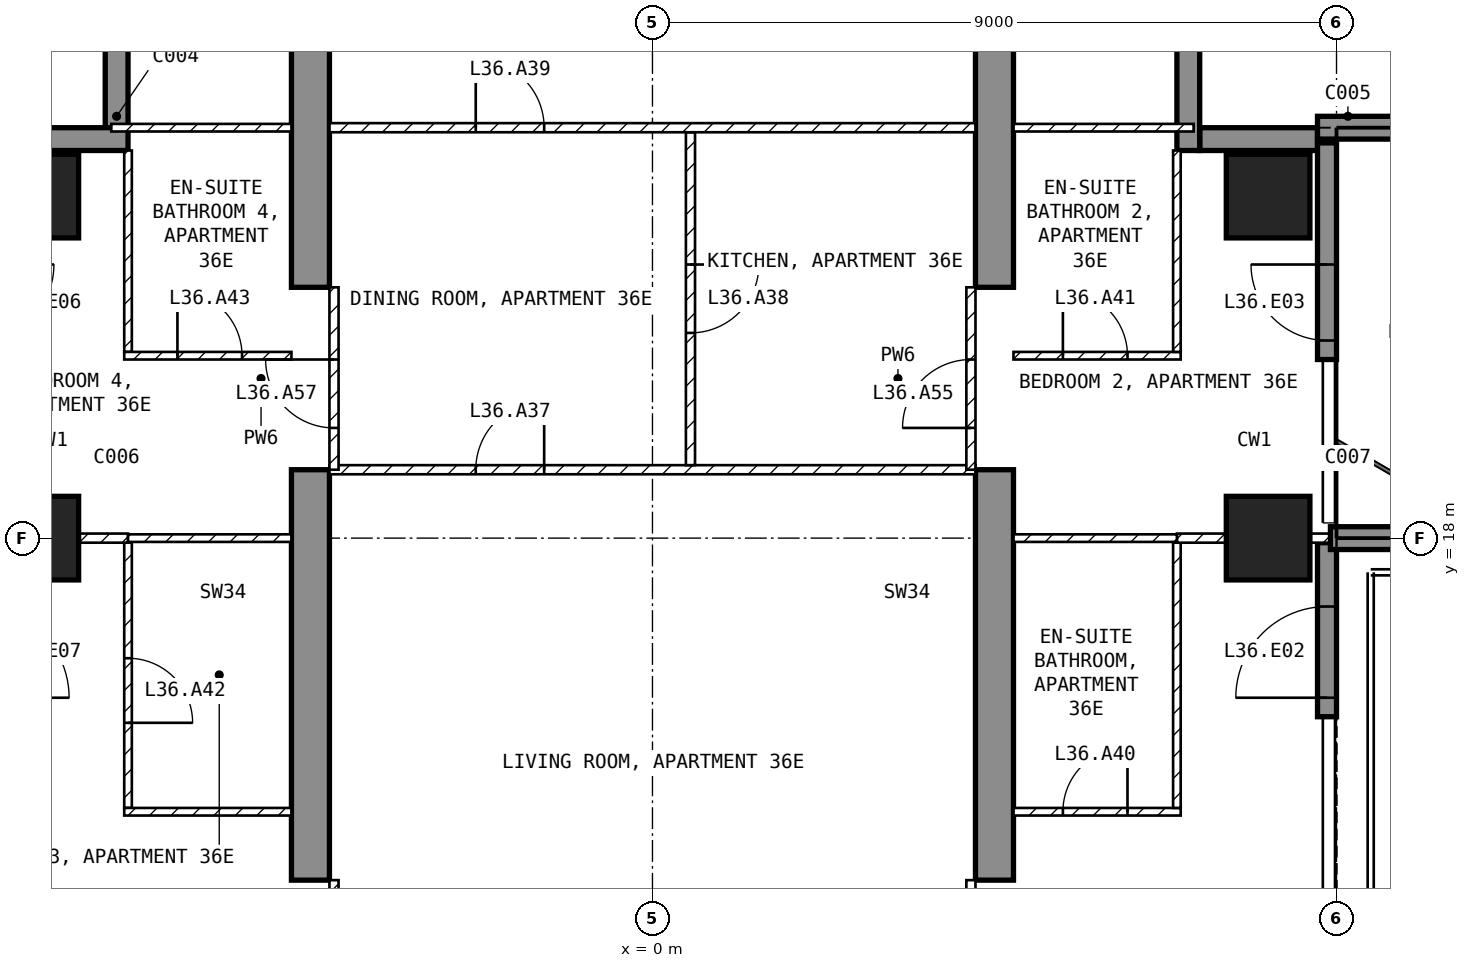
"""IFC4 building model, lengths in metres.
Left out: names, types, materials, properties, quantities, classifications, styles, units other than length and angle.
Written with IfcOpenShell. Run it as: python <this file> out.ifc"""

import sys

from ifc_helpers import new_model, si_unit, direction, frame, frame_2d, origin, origin_2d, place, context, subcontext, project, spatial, polyline, rectangle, outline, extrude, element, fill, save


model = new_model("IFC4")
c1 = context("Model", 3, precision=1e-05, world=origin(), true_north=direction((0.0, 1.0)))
c2 = subcontext(c1, "Body", "Model", "MODEL_VIEW")
j1 = project(units=[si_unit("LENGTHUNIT", "METRE"), si_unit("PLANEANGLEUNIT", "RADIAN")], contexts=[c1])
p1 = place(None, origin())
s1 = spatial("IfcSite", under=j1, at=p1, CompositionType="ELEMENT")
p2 = place(p1, origin())
s2 = spatial("IfcBuilding", under=s1, at=p2, CompositionType="ELEMENT")
p3 = place(p2, frame((0.0, 0.0, 147.9)))
s3 = spatial("IfcBuildingStorey", under=s2, at=p3, CompositionType="ELEMENT", Elevation=147.9)
for number, where, z_axis, x_axis in (
    (1, (-8.1, 18.0, -0.25), (0.0, 0.0, 1.0), (1.0, 0.0, 0.0)),
    (2, (-8.1, 22.5, -0.25), (0.0, 0.0, 1.0), (1.0, 0.0, 0.0)),
    (3, (8.1, 18.0, -0.25), (0.0, 0.0, 1.0), (1.0, 0.0, 0.0)),
    (4, (8.1, 22.5, -0.25), (0.0, 0.0, 1.0), (1.0, 0.0, 0.0)),
):
    element("IfcColumn", number, at=place(p3, frame(where, z_axis=z_axis, x_axis=x_axis)), inside=s3, PredefinedType="COLUMN", context=c2, shape_type="SweptSolid", body=[
        extrude(rectangle(XDim=1.1, YDim=1.1, at=origin_2d()), origin(), (0.0, 0.0, 1.0), 3.5),
    ])
for number, where, z_axis, x_axis in (
    (5, (-4.75, 9.0, -0.25), (1.0, 0.0, 0.0), (0.0, 1.0, 0.0)),
    (6, (4.25, 9.0, -0.25), (1.0, 0.0, 0.0), (0.0, 1.0, 0.0)),
):
    element("IfcWall", number, at=place(p3, frame(where, z_axis=z_axis, x_axis=x_axis)), inside=s3, PredefinedType="SHEAR", context=c2, shape_type="SweptSolid", body=[
        extrude(outline(polyline([(0.0, 0.0), (2.1, 0.0), (2.1, 2.65), (4.5, 2.65), (4.5, 0.0), (9.9, 0.0), (9.9, 2.65), (12.3, 2.65), (12.3, 0.0), (16.55, 0.0), (16.55, 3.5), (0.0, 3.5), (0.0, 0.0)])), origin(), (0.0, 0.0, 1.0), 0.5),
    ])
p4 = place(p3, frame((8.875, 15.65, 0.0), z_axis=(0.0, 0.0, 1.0), x_axis=(0.0, 1.0, 0.0)))
e7 = element("IfcWall", 7, at=p4, inside=s3, PredefinedType="SOLIDWALL", context=c2, shape_type="SweptSolid", body=[
    extrude(rectangle(XDim=2.29, YDim=0.25, at=frame_2d((1.145, 0.0))), origin(), (0.0, 0.0, 1.0), 3.25),
])
p5 = place(p4, frame((0.25, 0.0, 0.0)))
e8 = element("IfcOpeningElement", 8, at=p5, cuts=e7, PredefinedType="OPENING", context=c2, shape_type="SweptSolid", body=[
    extrude(rectangle(XDim=1.2, YDim=2.4, at=frame_2d((0.6, 1.2))), frame((0.0, 0.135, 0.0), z_axis=(0.0, -1.0, 0.0), x_axis=(1.0, 0.0, 0.0)), (0.0, 0.0, 1.0), 0.27),
])
p6 = place(p3, frame((8.875, 20.35, 0.0), z_axis=(0.0, 0.0, 1.0), x_axis=(0.0, 1.0, 0.0)))
e9 = element("IfcWall", 9, at=p6, inside=s3, PredefinedType="SOLIDWALL", context=c2, shape_type="SweptSolid", body=[
    extrude(rectangle(XDim=2.85, YDim=0.25, at=frame_2d((1.425, 0.0))), origin(), (0.0, 0.0, 1.0), 3.25),
])
p7 = place(p6, frame((0.25, 0.0, 0.0)))
e10 = element("IfcOpeningElement", 10, at=p7, cuts=e9, PredefinedType="OPENING", context=c2, shape_type="SweptSolid", body=[
    extrude(rectangle(XDim=1.0, YDim=2.4, at=frame_2d((0.5, 1.2))), frame((0.0, 0.135, 0.0), z_axis=(0.0, -1.0, 0.0), x_axis=(1.0, 0.0, 0.0)), (0.0, 0.0, 1.0), 0.27),
])
p8 = place(p3, frame((8.75, 23.25, 0.0), z_axis=(0.0, 0.0, 1.0), x_axis=(-1.0, 0.0, 0.0)))
e11 = element("IfcWall", 11, at=p8, inside=s3, PredefinedType="SOLIDWALL", context=c2, shape_type="SweptSolid", body=[
    extrude(rectangle(XDim=1.55, YDim=0.3, at=frame_2d((0.775, 0.0))), origin(), (0.0, 0.0, 1.0), 3.25),
])
p9 = place(p3, frame((7.05, 23.1, 0.0), z_axis=(0.0, 0.0, 1.0), x_axis=(0.0, 1.0, 0.0)))
e12 = element("IfcWall", 12, at=p9, inside=s3, PredefinedType="SOLIDWALL", context=c2, shape_type="SweptSolid", body=[
    extrude(rectangle(XDim=1.8, YDim=0.3, at=frame_2d((0.9, 0.0))), origin(), (0.0, 0.0, 1.0), 3.25),
])
p10 = place(p3, frame((-7.05, 25.2, 0.0), z_axis=(0.0, 0.0, 1.0), x_axis=(0.0, -1.0, 0.0)))
e13 = element("IfcWall", 13, at=p10, inside=s3, PredefinedType="SOLIDWALL", context=c2, shape_type="SweptSolid", body=[
    extrude(rectangle(XDim=1.8, YDim=0.3, at=frame_2d((0.9, 0.0))), origin(), (0.0, 0.0, 1.0), 3.25),
])
p11 = place(p3, frame((-6.9, 23.25, 0.0), z_axis=(0.0, 0.0, 1.0), x_axis=(-1.0, 0.0, 0.0)))
e14 = element("IfcWall", 14, at=p11, inside=s3, PredefinedType="SOLIDWALL", context=c2, shape_type="SweptSolid", body=[
    extrude(rectangle(XDim=1.85, YDim=0.3, at=frame_2d((0.925, 0.0))), origin(), (0.0, 0.0, 1.0), 3.25),
])
p12 = place(p3, frame((8.92, 18.0, 0.0), z_axis=(0.0, 0.0, 1.0), x_axis=(1.0, 0.0, 0.0)))
e15 = element("IfcWall", 15, at=p12, inside=s3, PredefinedType="SOLIDWALL", context=c2, shape_type="SweptSolid", body=[
    extrude(rectangle(XDim=2.82, YDim=0.3, at=frame_2d((1.41, 0.0))), origin(), (0.0, 0.0, 1.0), 3.25),
])
p13 = place(p3, frame((8.75, 23.4, 0.0), z_axis=(0.0, 0.0, 1.0), x_axis=(1.0, 0.0, 0.0)))
e16 = element("IfcWall", 16, at=p13, inside=s3, PredefinedType="SOLIDWALL", context=c2, shape_type="SweptSolid", body=[
    extrude(rectangle(XDim=2.95, YDim=0.3, at=frame_2d((1.475, 0.0))), origin(), (0.0, 0.0, 1.0), 3.25),
])
p14 = place(p3, frame((-4.25, 18.9, 0.0), z_axis=(0.0, 0.0, 1.0), x_axis=(1.0, 0.0, 0.0)))
e17 = element("IfcWall", 17, at=p14, inside=s3, PredefinedType="PARTITIONING", context=c2, shape_type="SweptSolid", body=[
    extrude(rectangle(XDim=8.5, YDim=0.12, at=frame_2d((4.25, 0.0))), origin(), (0.0, 0.0, 1.0), 3.25),
])
p15 = place(p14, frame((1.925, 0.0, 0.0)))
e18 = element("IfcOpeningElement", 18, at=p15, cuts=e17, PredefinedType="OPENING", context=c2, shape_type="SweptSolid", body=[
    extrude(rectangle(XDim=0.9, YDim=2.1, at=frame_2d((0.45, 1.05))), frame((0.0, 0.07, 0.0), z_axis=(0.0, -1.0, 0.0), x_axis=(1.0, 0.0, 0.0)), (0.0, 0.0, 1.0), 0.14),
])
p16 = place(p3, frame((0.5, 23.34, 0.0), z_axis=(0.0, 0.0, 1.0), x_axis=(0.0, -1.0, 0.0)))
e19 = element("IfcWall", 19, at=p16, inside=s3, PredefinedType="PARTITIONING", context=c2, shape_type="SweptSolid", body=[
    extrude(rectangle(XDim=4.38, YDim=0.12, at=frame_2d((2.19, 0.0))), origin(), (0.0, 0.0, 1.0), 3.25),
])
p17 = place(p16, frame((1.74, 0.0, 0.0)))
e20 = element("IfcOpeningElement", 20, at=p17, cuts=e19, PredefinedType="OPENING", context=c2, shape_type="SweptSolid", body=[
    extrude(rectangle(XDim=0.9, YDim=2.1, at=frame_2d((0.45, 1.05))), frame((0.0, 0.07, 0.0), z_axis=(0.0, -1.0, 0.0), x_axis=(1.0, 0.0, 0.0)), (0.0, 0.0, 1.0), 0.14),
])
p18 = place(p3, frame((-4.25, 23.4, 0.0), z_axis=(0.0, 0.0, 1.0), x_axis=(1.0, 0.0, 0.0)))
e21 = element("IfcWall", 21, at=p18, inside=s3, PredefinedType="PARTITIONING", context=c2, shape_type="SweptSolid", body=[
    extrude(rectangle(XDim=8.5, YDim=0.12, at=frame_2d((4.25, 0.0))), origin(), (0.0, 0.0, 1.0), 3.25),
])
p19 = place(p18, frame((1.925, 0.0, 0.0)))
e22 = element("IfcOpeningElement", 22, at=p19, cuts=e21, PredefinedType="OPENING", context=c2, shape_type="SweptSolid", body=[
    extrude(rectangle(XDim=0.9, YDim=2.1, at=frame_2d((0.45, 1.05))), frame((0.0, 0.07, 0.0), z_axis=(0.0, -1.0, 0.0), x_axis=(1.0, 0.0, 0.0)), (0.0, 0.0, 1.0), 0.14),
])
p20 = place(p3, frame((4.75, 14.4, 0.0), z_axis=(0.0, 0.0, 1.0), x_axis=(1.0, 0.0, 0.0)))
e23 = element("IfcWall", 23, at=p20, inside=s3, PredefinedType="PARTITIONING", context=c2, shape_type="SweptSolid", body=[
    extrude(rectangle(XDim=2.2, YDim=0.1, at=frame_2d((1.1, 0.0))), origin(), (0.0, 0.0, 1.0), 3.25),
])
p21 = place(p20, frame((0.65, 0.0, 0.0)))
e24 = element("IfcOpeningElement", 24, at=p21, cuts=e23, PredefinedType="OPENING", context=c2, shape_type="SweptSolid", body=[
    extrude(rectangle(XDim=0.85, YDim=2.1, at=frame_2d((0.425, 1.05))), frame((0.0, 0.06, 0.0), z_axis=(0.0, -1.0, 0.0), x_axis=(1.0, 0.0, 0.0)), (0.0, 0.0, 1.0), 0.12),
])
p22 = place(p3, frame((6.9, 14.45, 0.0), z_axis=(0.0, 0.0, 1.0), x_axis=(0.0, 1.0, 0.0)))
e25 = element("IfcWall", 25, at=p22, inside=s3, PredefinedType="PARTITIONING", context=c2, shape_type="SweptSolid", body=[
    extrude(rectangle(XDim=3.49, YDim=0.1, at=frame_2d((1.745, 0.0))), origin(), (0.0, 0.0, 1.0), 3.25),
])
p23 = place(p3, frame((6.9, 18.0, 0.0), z_axis=(0.0, 0.0, 1.0), x_axis=(1.0, 0.0, 0.0)))
e26 = element("IfcWall", 26, at=p23, inside=s3, PredefinedType="PARTITIONING", context=c2, shape_type="SweptSolid", body=[
    extrude(rectangle(XDim=2.02, YDim=0.12, at=frame_2d((1.01, 0.0))), origin(), (0.0, 0.0, 1.0), 2.414),
])
p24 = place(p3, frame((4.75, 18.0, 0.0), z_axis=(0.0, 0.0, 1.0), x_axis=(1.0, 0.0, 0.0)))
e27 = element("IfcWall", 27, at=p24, inside=s3, PredefinedType="PARTITIONING", context=c2, shape_type="SweptSolid", body=[
    extrude(rectangle(XDim=2.15, YDim=0.1, at=frame_2d((1.075, 0.0))), origin(), (0.0, 0.0, 1.0), 2.414),
])
p25 = place(p3, frame((4.75, 20.4, 0.0), z_axis=(0.0, 0.0, 1.0), x_axis=(1.0, 0.0, 0.0)))
e28 = element("IfcWall", 28, at=p25, inside=s3, PredefinedType="PARTITIONING", context=c2, shape_type="SweptSolid", body=[
    extrude(rectangle(XDim=2.2, YDim=0.1, at=frame_2d((1.1, 0.0))), origin(), (0.0, 0.0, 1.0), 3.25),
])
p26 = place(p25, frame((0.65, 0.0, 0.0)))
e29 = element("IfcOpeningElement", 29, at=p26, cuts=e28, PredefinedType="OPENING", context=c2, shape_type="SweptSolid", body=[
    extrude(rectangle(XDim=0.85, YDim=2.1, at=frame_2d((0.425, 1.05))), frame((0.0, 0.06, 0.0), z_axis=(0.0, -1.0, 0.0), x_axis=(1.0, 0.0, 0.0)), (0.0, 0.0, 1.0), 0.12),
])
p27 = place(p3, frame((6.9, 20.45, 0.0), z_axis=(0.0, 0.0, 1.0), x_axis=(0.0, 1.0, 0.0)))
e30 = element("IfcWall", 30, at=p27, inside=s3, PredefinedType="PARTITIONING", context=c2, shape_type="SweptSolid", body=[
    extrude(rectangle(XDim=2.65, YDim=0.1, at=frame_2d((1.325, 0.0))), origin(), (0.0, 0.0, 1.0), 3.25),
])
p28 = place(p3, frame((4.75, 23.4, 0.0), z_axis=(0.0, 0.0, 1.0), x_axis=(1.0, 0.0, 0.0)))
e31 = element("IfcWall", 31, at=p28, inside=s3, PredefinedType="PARTITIONING", context=c2, shape_type="SweptSolid", body=[
    extrude(rectangle(XDim=2.37, YDim=0.1, at=frame_2d((1.185, 0.0))), origin(), (0.0, 0.0, 1.0), 3.25),
])
p29 = place(p3, frame((-6.9, 17.94, 0.0), z_axis=(0.0, 0.0, 1.0), x_axis=(0.0, -1.0, 0.0)))
e32 = element("IfcWall", 32, at=p29, inside=s3, PredefinedType="PARTITIONING", context=c2, shape_type="SweptSolid", body=[
    extrude(rectangle(XDim=3.49, YDim=0.1, at=frame_2d((1.745, 0.0))), origin(), (0.0, 0.0, 1.0), 3.25),
])
p30 = place(p29, frame((1.52, 0.0, 0.0)))
e33 = element("IfcOpeningElement", 33, at=p30, cuts=e32, PredefinedType="OPENING", context=c2, shape_type="SweptSolid", body=[
    extrude(rectangle(XDim=0.85, YDim=2.1, at=frame_2d((0.425, 1.05))), frame((0.0, 0.06, 0.0), z_axis=(0.0, -1.0, 0.0), x_axis=(1.0, 0.0, 0.0)), (0.0, 0.0, 1.0), 0.12),
])
p31 = place(p3, frame((-6.95, 14.4, 0.0), z_axis=(0.0, 0.0, 1.0), x_axis=(1.0, 0.0, 0.0)))
e34 = element("IfcWall", 34, at=p31, inside=s3, PredefinedType="PARTITIONING", context=c2, shape_type="SweptSolid", body=[
    extrude(rectangle(XDim=2.2, YDim=0.1, at=frame_2d((1.1, 0.0))), origin(), (0.0, 0.0, 1.0), 3.25),
])
p32 = place(p3, frame((-8.92, 18.0, 0.0), z_axis=(0.0, 0.0, 1.0), x_axis=(1.0, 0.0, 0.0)))
e35 = element("IfcWall", 35, at=p32, inside=s3, PredefinedType="PARTITIONING", context=c2, shape_type="SweptSolid", body=[
    extrude(rectangle(XDim=2.02, YDim=0.12, at=frame_2d((1.01, 0.0))), origin(), (0.0, 0.0, 1.0), 2.414),
])
p33 = place(p3, frame((-6.9, 18.0, 0.0), z_axis=(0.0, 0.0, 1.0), x_axis=(1.0, 0.0, 0.0)))
e36 = element("IfcWall", 36, at=p33, inside=s3, PredefinedType="PARTITIONING", context=c2, shape_type="SweptSolid", body=[
    extrude(rectangle(XDim=2.15, YDim=0.1, at=frame_2d((1.075, 0.0))), origin(), (0.0, 0.0, 1.0), 2.414),
])
p34 = place(p3, frame((-6.9, 23.1, 0.0), z_axis=(0.0, 0.0, 1.0), x_axis=(0.0, -1.0, 0.0)))
e37 = element("IfcWall", 37, at=p34, inside=s3, PredefinedType="PARTITIONING", context=c2, shape_type="SweptSolid", body=[
    extrude(rectangle(XDim=2.65, YDim=0.1, at=frame_2d((1.325, 0.0))), origin(), (0.0, 0.0, 1.0), 3.25),
])
p35 = place(p3, frame((-6.95, 20.4, 0.0), z_axis=(0.0, 0.0, 1.0), x_axis=(1.0, 0.0, 0.0)))
e38 = element("IfcWall", 38, at=p35, inside=s3, PredefinedType="PARTITIONING", context=c2, shape_type="SweptSolid", body=[
    extrude(rectangle(XDim=2.2, YDim=0.1, at=frame_2d((1.1, 0.0))), origin(), (0.0, 0.0, 1.0), 3.25),
])
p36 = place(p35, frame((0.7, 0.0, 0.0)))
e39 = element("IfcOpeningElement", 39, at=p36, cuts=e38, PredefinedType="OPENING", context=c2, shape_type="SweptSolid", body=[
    extrude(rectangle(XDim=0.85, YDim=2.1, at=frame_2d((0.425, 1.05))), frame((0.0, 0.06, 0.0), z_axis=(0.0, -1.0, 0.0), x_axis=(1.0, 0.0, 0.0)), (0.0, 0.0, 1.0), 0.12),
])
p37 = place(p3, frame((-7.12, 23.4, 0.0), z_axis=(0.0, 0.0, 1.0), x_axis=(1.0, 0.0, 0.0)))
e40 = element("IfcWall", 40, at=p37, inside=s3, PredefinedType="PARTITIONING", context=c2, shape_type="SweptSolid", body=[
    extrude(rectangle(XDim=2.37, YDim=0.1, at=frame_2d((1.185, 0.0))), origin(), (0.0, 0.0, 1.0), 3.25),
])
p38 = place(p3, frame((4.19, 11.1, 0.0), z_axis=(0.0, 0.0, 1.0), x_axis=(0.0, 1.0, 0.0)))
e41 = element("IfcWall", 41, at=p38, inside=s3, PredefinedType="PARTITIONING", context=c2, shape_type="SweptSolid", body=[
    extrude(rectangle(XDim=2.4, YDim=0.12, at=frame_2d((1.2, 0.0))), origin(), (0.0, 0.0, 1.0), 2.4),
])
p39 = place(p38, frame((0.75, 0.0, 0.0)))
e42 = element("IfcOpeningElement", 42, at=p39, cuts=e41, PredefinedType="OPENING", context=c2, shape_type="SweptSolid", body=[
    extrude(rectangle(XDim=0.9, YDim=2.1, at=frame_2d((0.45, 1.05))), frame((0.0, 0.07, 0.0), z_axis=(0.0, -1.0, 0.0), x_axis=(1.0, 0.0, 0.0)), (0.0, 0.0, 1.0), 0.14),
])
p40 = place(p3, frame((4.19, 18.9, 0.0), z_axis=(0.0, 0.0, 1.0), x_axis=(0.0, 1.0, 0.0)))
e43 = element("IfcWall", 43, at=p40, inside=s3, PredefinedType="PARTITIONING", context=c2, shape_type="SweptSolid", body=[
    extrude(rectangle(XDim=2.4, YDim=0.12, at=frame_2d((1.2, 0.0))), origin(), (0.0, 0.0, 1.0), 2.4),
])
p41 = place(p40, frame((0.55, 0.0, 0.0)))
e44 = element("IfcOpeningElement", 44, at=p41, cuts=e43, PredefinedType="OPENING", context=c2, shape_type="SweptSolid", body=[
    extrude(rectangle(XDim=0.9, YDim=2.1, at=frame_2d((0.45, 1.05))), frame((0.0, 0.07, 0.0), z_axis=(0.0, -1.0, 0.0), x_axis=(1.0, 0.0, 0.0)), (0.0, 0.0, 1.0), 0.14),
])
p42 = place(p3, frame((-4.19, 11.1, 0.0), z_axis=(0.0, 0.0, 1.0), x_axis=(0.0, 1.0, 0.0)))
e45 = element("IfcWall", 45, at=p42, inside=s3, PredefinedType="PARTITIONING", context=c2, shape_type="SweptSolid", body=[
    extrude(rectangle(XDim=2.4, YDim=0.12, at=frame_2d((1.2, 0.0))), origin(), (0.0, 0.0, 1.0), 2.4),
])
p43 = place(p42, frame((0.75, 0.0, 0.0)))
e46 = element("IfcOpeningElement", 46, at=p43, cuts=e45, PredefinedType="OPENING", context=c2, shape_type="SweptSolid", body=[
    extrude(rectangle(XDim=0.9, YDim=2.1, at=frame_2d((0.45, 1.05))), frame((0.0, 0.07, 0.0), z_axis=(0.0, -1.0, 0.0), x_axis=(1.0, 0.0, 0.0)), (0.0, 0.0, 1.0), 0.14),
])
p44 = place(p3, frame((-4.19, 18.9, 0.0), z_axis=(0.0, 0.0, 1.0), x_axis=(0.0, 1.0, 0.0)))
e47 = element("IfcWall", 47, at=p44, inside=s3, PredefinedType="PARTITIONING", context=c2, shape_type="SweptSolid", body=[
    extrude(rectangle(XDim=2.4, YDim=0.12, at=frame_2d((1.2, 0.0))), origin(), (0.0, 0.0, 1.0), 2.4),
])
p45 = place(p44, frame((0.55, 0.0, 0.0)))
e48 = element("IfcOpeningElement", 48, at=p45, cuts=e47, PredefinedType="OPENING", context=c2, shape_type="SweptSolid", body=[
    extrude(rectangle(XDim=0.9, YDim=2.1, at=frame_2d((0.45, 1.05))), frame((0.0, 0.07, 0.0), z_axis=(0.0, -1.0, 0.0), x_axis=(1.0, 0.0, 0.0)), (0.0, 0.0, 1.0), 0.14),
])
p46 = place(p5, origin())
e49 = element("IfcDoor", 49, at=p46, inside=s3, OperationType="SINGLE_SWING_LEFT", PredefinedType="DOOR", context=c2, shape_type="SweptSolid", body=[
    extrude(rectangle(XDim=1.2, YDim=2.4, at=frame_2d((0.6, 1.2))), frame((0.0, 0.025, 0.0), z_axis=(0.0, -1.0, 0.0), x_axis=(1.0, 0.0, 0.0)), (0.0, 0.0, 1.0), 0.05),
])
fill(e8, e49)
p47 = place(p7, origin())
e50 = element("IfcDoor", 50, at=p47, inside=s3, OperationType="SINGLE_SWING_RIGHT", PredefinedType="DOOR", context=c2, shape_type="SweptSolid", body=[
    extrude(rectangle(XDim=1.0, YDim=2.4, at=frame_2d((0.5, 1.2))), frame((0.0, 0.025, 0.0), z_axis=(0.0, -1.0, 0.0), x_axis=(1.0, 0.0, 0.0)), (0.0, 0.0, 1.0), 0.05),
])
fill(e10, e50)
p48 = place(p15, origin())
e51 = element("IfcDoor", 51, at=p48, inside=s3, OperationType="SINGLE_SWING_RIGHT", PredefinedType="DOOR", context=c2, shape_type="SweptSolid", body=[
    extrude(rectangle(XDim=0.9, YDim=2.1, at=frame_2d((0.45, 1.05))), frame((0.0, 0.025, 0.0), z_axis=(0.0, -1.0, 0.0), x_axis=(1.0, 0.0, 0.0)), (0.0, 0.0, 1.0), 0.05),
])
fill(e18, e51)
p49 = place(p17, origin())
e52 = element("IfcDoor", 52, at=p49, inside=s3, OperationType="SINGLE_SWING_LEFT", PredefinedType="DOOR", context=c2, shape_type="SweptSolid", body=[
    extrude(rectangle(XDim=0.9, YDim=2.1, at=frame_2d((0.45, 1.05))), frame((0.0, 0.025, 0.0), z_axis=(0.0, -1.0, 0.0), x_axis=(1.0, 0.0, 0.0)), (0.0, 0.0, 1.0), 0.05),
])
fill(e20, e52)
p50 = place(p19, origin())
e53 = element("IfcDoor", 53, at=p50, inside=s3, OperationType="SINGLE_SWING_LEFT", PredefinedType="DOOR", context=c2, shape_type="SweptSolid", body=[
    extrude(rectangle(XDim=0.9, YDim=2.1, at=frame_2d((0.45, 1.05))), frame((0.0, 0.025, 0.0), z_axis=(0.0, -1.0, 0.0), x_axis=(1.0, 0.0, 0.0)), (0.0, 0.0, 1.0), 0.05),
])
fill(e22, e53)
p51 = place(p21, origin())
e54 = element("IfcDoor", 54, at=p51, inside=s3, OperationType="SINGLE_SWING_RIGHT", PredefinedType="DOOR", context=c2, shape_type="SweptSolid", body=[
    extrude(rectangle(XDim=0.85, YDim=2.1, at=frame_2d((0.425, 1.05))), frame((0.0, 0.025, 0.0), z_axis=(0.0, -1.0, 0.0), x_axis=(1.0, 0.0, 0.0)), (0.0, 0.0, 1.0), 0.05),
])
fill(e24, e54)
p52 = place(p26, origin())
e55 = element("IfcDoor", 55, at=p52, inside=s3, OperationType="SINGLE_SWING_LEFT", PredefinedType="DOOR", context=c2, shape_type="SweptSolid", body=[
    extrude(rectangle(XDim=0.85, YDim=2.1, at=frame_2d((0.425, 1.05))), frame((0.0, 0.025, 0.0), z_axis=(0.0, -1.0, 0.0), x_axis=(1.0, 0.0, 0.0)), (0.0, 0.0, 1.0), 0.05),
])
fill(e29, e55)
p53 = place(p30, origin())
e56 = element("IfcDoor", 56, at=p53, inside=s3, OperationType="SINGLE_SWING_RIGHT", PredefinedType="DOOR", context=c2, shape_type="SweptSolid", body=[
    extrude(rectangle(XDim=0.85, YDim=2.1, at=frame_2d((0.425, 1.05))), frame((0.0, 0.025, 0.0), z_axis=(0.0, -1.0, 0.0), x_axis=(1.0, 0.0, 0.0)), (0.0, 0.0, 1.0), 0.05),
])
fill(e33, e56)
p54 = place(p36, origin())
e57 = element("IfcDoor", 57, at=p54, inside=s3, OperationType="SINGLE_SWING_LEFT", PredefinedType="DOOR", context=c2, shape_type="SweptSolid", body=[
    extrude(rectangle(XDim=0.85, YDim=2.1, at=frame_2d((0.425, 1.05))), frame((0.0, 0.025, 0.0), z_axis=(0.0, -1.0, 0.0), x_axis=(1.0, 0.0, 0.0)), (0.0, 0.0, 1.0), 0.05),
])
fill(e39, e57)
p55 = place(p41, origin())
e58 = element("IfcDoor", 58, at=p55, inside=s3, OperationType="SINGLE_SWING_LEFT", PredefinedType="DOOR", context=c2, shape_type="SweptSolid", body=[
    extrude(rectangle(XDim=0.9, YDim=2.1, at=frame_2d((0.45, 1.05))), frame((0.0, 0.025, 0.0), z_axis=(0.0, -1.0, 0.0), x_axis=(1.0, 0.0, 0.0)), (0.0, 0.0, 1.0), 0.05),
])
fill(e44, e58)
p56 = place(p45, origin())
e59 = element("IfcDoor", 59, at=p56, inside=s3, OperationType="SINGLE_SWING_RIGHT", PredefinedType="DOOR", context=c2, shape_type="SweptSolid", body=[
    extrude(rectangle(XDim=0.9, YDim=2.1, at=frame_2d((0.45, 1.05))), frame((0.0, 0.025, 0.0), z_axis=(0.0, -1.0, 0.0), x_axis=(1.0, 0.0, 0.0)), (0.0, 0.0, 1.0), 0.05),
])
fill(e48, e59)
save(model, sys.argv[1])
